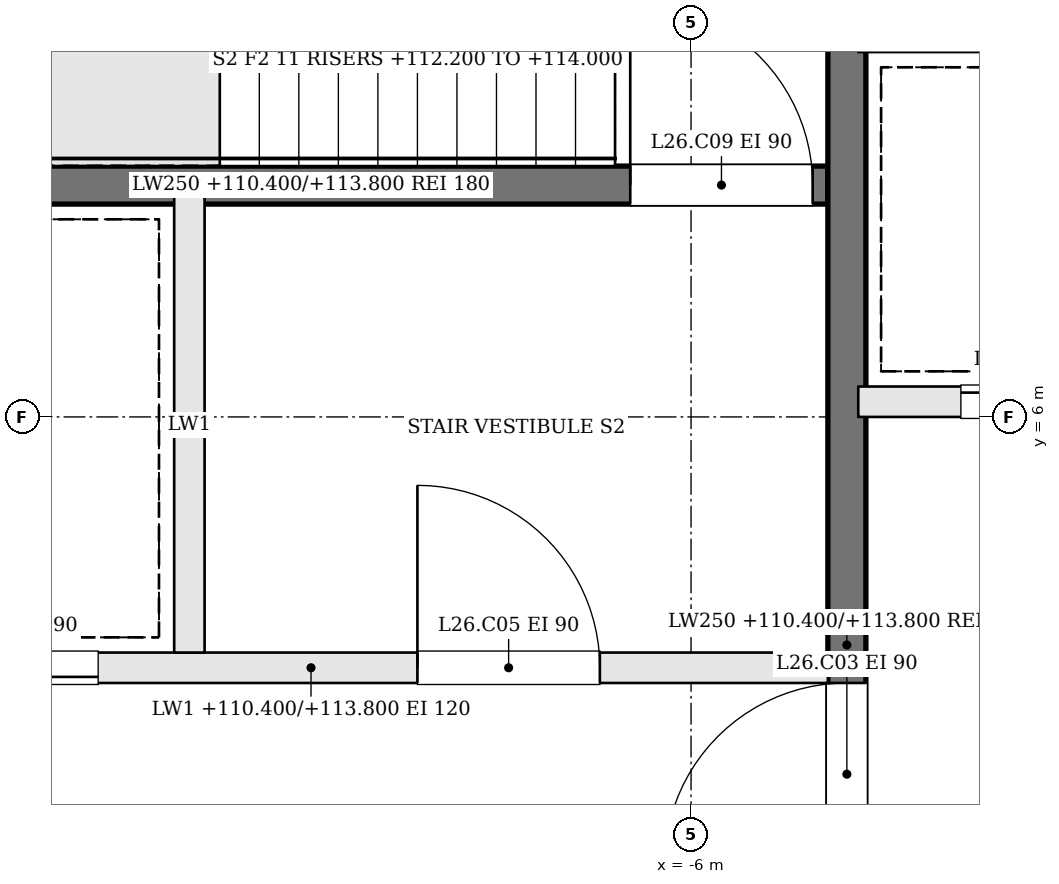
"""IFC4 building model, lengths in metres.
Left out: names, types, materials, properties, quantities, classifications, styles, units other than length and angle.
Written with IfcOpenShell. Run it as: python <this file> out.ifc"""

import sys

from ifc_helpers import new_model, si_unit, direction, frame, frame_2d, origin, place, context, subcontext, project, spatial, rectangle, extrude, element, fill, save


model = new_model("IFC4")
c1 = context("Model", 3, precision=1e-05, world=origin(), true_north=direction((0.0, 1.0)))
c2 = subcontext(c1, "Body", "Model", "MODEL_VIEW")
j1 = project(units=[si_unit("LENGTHUNIT", "METRE"), si_unit("PLANEANGLEUNIT", "RADIAN")], contexts=[c1])
p1 = place(None, origin())
s1 = spatial("IfcSite", under=j1, at=p1, CompositionType="ELEMENT")
p2 = place(p1, origin())
s2 = spatial("IfcBuilding", under=s1, at=p2, CompositionType="ELEMENT")
p3 = place(p2, frame((0.0, 0.0, 110.4)))
s3 = spatial("IfcBuildingStorey", under=s2, at=p3, CompositionType="ELEMENT", Elevation=110.4)
p4 = place(p3, frame((-11.9, 4.35, 0.0), z_axis=(0.0, 0.0, 1.0), x_axis=(1.0, 0.0, 0.0)))
e1 = element("IfcWall", 1, at=p4, inside=s3, PredefinedType="SOLIDWALL", context=c2, shape_type="SweptSolid", body=[
    extrude(rectangle(XDim=6.8, YDim=0.2, at=frame_2d((3.4, 0.0))), origin(), (0.0, 0.0, 1.0), 3.4),
])
p5 = place(p4, frame((4.1, 0.0, 0.0)))
e2 = element("IfcOpeningElement", 2, at=p5, cuts=e1, PredefinedType="OPENING", context=c2, shape_type="SweptSolid", body=[
    extrude(rectangle(XDim=1.2, YDim=2.1, at=frame_2d((0.6, 1.05))), frame((0.0, 0.11, 0.0), z_axis=(0.0, -1.0, 0.0), x_axis=(1.0, 0.0, 0.0)), (0.0, 0.0, 1.0), 0.22),
])
p6 = place(p4, frame((0.8, 0.0, 0.0)))
e3 = element("IfcOpeningElement", 3, at=p6, cuts=e1, PredefinedType="OPENING", context=c2, shape_type="SweptSolid", body=[
    extrude(rectangle(XDim=1.2, YDim=2.1, at=frame_2d((0.6, 1.05))), frame((0.0, 0.11, 0.0), z_axis=(0.0, -1.0, 0.0), x_axis=(1.0, 0.0, 0.0)), (0.0, 0.0, 1.0), 0.22),
])
p7 = place(p3, frame((-11.9, 7.525, 0.0), z_axis=(0.0, 0.0, 1.0), x_axis=(1.0, 0.0, 0.0)))
e4 = element("IfcWall", 4, at=p7, inside=s3, PredefinedType="SOLIDWALL", context=c2, shape_type="SweptSolid", body=[
    extrude(rectangle(XDim=6.8, YDim=0.25, at=frame_2d((3.4, 0.0))), origin(), (0.0, 0.0, 1.0), 3.4),
])
p8 = place(p7, frame((5.5, 0.0, 0.0)))
e5 = element("IfcOpeningElement", 5, at=p8, cuts=e4, PredefinedType="OPENING", context=c2, shape_type="SweptSolid", body=[
    extrude(rectangle(XDim=1.2, YDim=2.1, at=frame_2d((0.6, 1.05))), frame((0.0, 0.135, 0.0), z_axis=(0.0, -1.0, 0.0), x_axis=(1.0, 0.0, 0.0)), (0.0, 0.0, 1.0), 0.27),
])
p9 = place(p3, frame((-9.3, 4.45, 0.0), z_axis=(0.0, 0.0, 1.0), x_axis=(0.0, 1.0, 0.0)))
e6 = element("IfcWall", 6, at=p9, inside=s3, PredefinedType="SOLIDWALL", context=c2, shape_type="SweptSolid", body=[
    extrude(rectangle(XDim=3.0, YDim=0.2, at=frame_2d((1.5, 0.0))), origin(), (0.0, 0.0, 1.0), 3.4),
])
p10 = place(p3, frame((-4.975, -1.9, 0.0), z_axis=(0.0, 0.0, 1.0), x_axis=(0.0, 1.0, 0.0)))
e7 = element("IfcWall", 7, at=p10, inside=s3, PredefinedType="SOLIDWALL", context=c2, shape_type="SweptSolid", body=[
    extrude(rectangle(XDim=12.8, YDim=0.25, at=frame_2d((6.4, 0.0))), origin(), (0.0, 0.0, 1.0), 3.4),
])
p11 = place(p10, frame((4.95, 0.0, 0.0)))
e8 = element("IfcOpeningElement", 8, at=p11, cuts=e7, PredefinedType="OPENING", context=c2, shape_type="SweptSolid", body=[
    extrude(rectangle(XDim=1.2, YDim=2.1, at=frame_2d((0.6, 1.05))), frame((0.0, 0.135, 0.0), z_axis=(0.0, -1.0, 0.0), x_axis=(1.0, 0.0, 0.0)), (0.0, 0.0, 1.0), 0.27),
])
p12 = place(p3, frame((-4.9, 6.1, 0.0), z_axis=(0.0, 0.0, 1.0), x_axis=(1.0, 0.0, 0.0)))
e9 = element("IfcWall", 9, at=p12, inside=s3, PredefinedType="SOLIDWALL", context=c2, shape_type="SweptSolid", body=[
    extrude(rectangle(XDim=9.8, YDim=0.2, at=frame_2d((4.9, 0.0))), origin(), (0.0, 0.0, 1.0), 3.4),
])
p13 = place(p12, frame((0.675, 0.0, 0.0)))
e10 = element("IfcOpeningElement", 10, at=p13, cuts=e9, PredefinedType="OPENING", context=c2, shape_type="SweptSolid", body=[
    extrude(rectangle(XDim=1.1, YDim=2.1, at=frame_2d((0.55, 1.05))), frame((0.0, 0.11, 0.0), z_axis=(0.0, -1.0, 0.0), x_axis=(1.0, 0.0, 0.0)), (0.0, 0.0, 1.0), 0.22),
])
p14 = place(p12, frame((3.125, 0.0, 0.0)))
e11 = element("IfcOpeningElement", 11, at=p14, cuts=e9, PredefinedType="OPENING", context=c2, shape_type="SweptSolid", body=[
    extrude(rectangle(XDim=1.1, YDim=2.1, at=frame_2d((0.55, 1.05))), frame((0.0, 0.11, 0.0), z_axis=(0.0, -1.0, 0.0), x_axis=(1.0, 0.0, 0.0)), (0.0, 0.0, 1.0), 0.22),
])
p15 = place(p12, frame((5.575, 0.0, 0.0)))
e12 = element("IfcOpeningElement", 12, at=p15, cuts=e9, PredefinedType="OPENING", context=c2, shape_type="SweptSolid", body=[
    extrude(rectangle(XDim=1.1, YDim=2.1, at=frame_2d((0.55, 1.05))), frame((0.0, 0.11, 0.0), z_axis=(0.0, -1.0, 0.0), x_axis=(1.0, 0.0, 0.0)), (0.0, 0.0, 1.0), 0.22),
])
p16 = place(p12, frame((8.025, 0.0, 0.0)))
e13 = element("IfcOpeningElement", 13, at=p16, cuts=e9, PredefinedType="OPENING", context=c2, shape_type="SweptSolid", body=[
    extrude(rectangle(XDim=1.1, YDim=2.1, at=frame_2d((0.55, 1.05))), frame((0.0, 0.11, 0.0), z_axis=(0.0, -1.0, 0.0), x_axis=(1.0, 0.0, 0.0)), (0.0, 0.0, 1.0), 0.22),
])
p17 = place(p11, origin())
e14 = element("IfcDoor", 14, at=p17, inside=s3, OperationType="SINGLE_SWING_LEFT", PredefinedType="DOOR", context=c2, shape_type="SweptSolid", body=[
    extrude(rectangle(XDim=1.2, YDim=2.1, at=frame_2d((0.6, 1.05))), frame((0.0, 0.025, 0.0), z_axis=(0.0, -1.0, 0.0), x_axis=(1.0, 0.0, 0.0)), (0.0, 0.0, 1.0), 0.05),
])
fill(e8, e14)
p18 = place(p5, origin())
e15 = element("IfcDoor", 15, at=p18, inside=s3, OperationType="SINGLE_SWING_LEFT", PredefinedType="DOOR", context=c2, shape_type="SweptSolid", body=[
    extrude(rectangle(XDim=1.2, YDim=2.1, at=frame_2d((0.6, 1.05))), frame((0.0, 0.025, 0.0), z_axis=(0.0, -1.0, 0.0), x_axis=(1.0, 0.0, 0.0)), (0.0, 0.0, 1.0), 0.05),
])
fill(e2, e15)
p19 = place(p8, origin())
e16 = element("IfcDoor", 16, at=p19, inside=s3, OperationType="SINGLE_SWING_LEFT", PredefinedType="DOOR", context=c2, shape_type="SweptSolid", body=[
    extrude(rectangle(XDim=1.2, YDim=2.1, at=frame_2d((0.6, 1.05))), frame((0.0, 0.025, 0.0), z_axis=(0.0, -1.0, 0.0), x_axis=(1.0, 0.0, 0.0)), (0.0, 0.0, 1.0), 0.05),
])
fill(e5, e16)
p20 = place(p6, origin())
e17 = element("IfcDoor", 17, at=p20, inside=s3, OperationType="SLIDING_TO_RIGHT", PredefinedType="DOOR", context=c2, shape_type="SweptSolid", body=[
    extrude(rectangle(XDim=1.2, YDim=2.1, at=frame_2d((0.6, 1.05))), frame((0.0, 0.025, 0.0), z_axis=(0.0, -1.0, 0.0), x_axis=(1.0, 0.0, 0.0)), (0.0, 0.0, 1.0), 0.05),
])
fill(e3, e17)
p21 = place(p13, origin())
e18 = element("IfcDoor", 18, at=p21, inside=s3, OperationType="SLIDING_TO_RIGHT", PredefinedType="DOOR", context=c2, shape_type="SweptSolid", body=[
    extrude(rectangle(XDim=1.1, YDim=2.1, at=frame_2d((0.55, 1.05))), frame((0.0, 0.025, 0.0), z_axis=(0.0, -1.0, 0.0), x_axis=(1.0, 0.0, 0.0)), (0.0, 0.0, 1.0), 0.05),
])
fill(e10, e18)
save(model, sys.argv[1])
